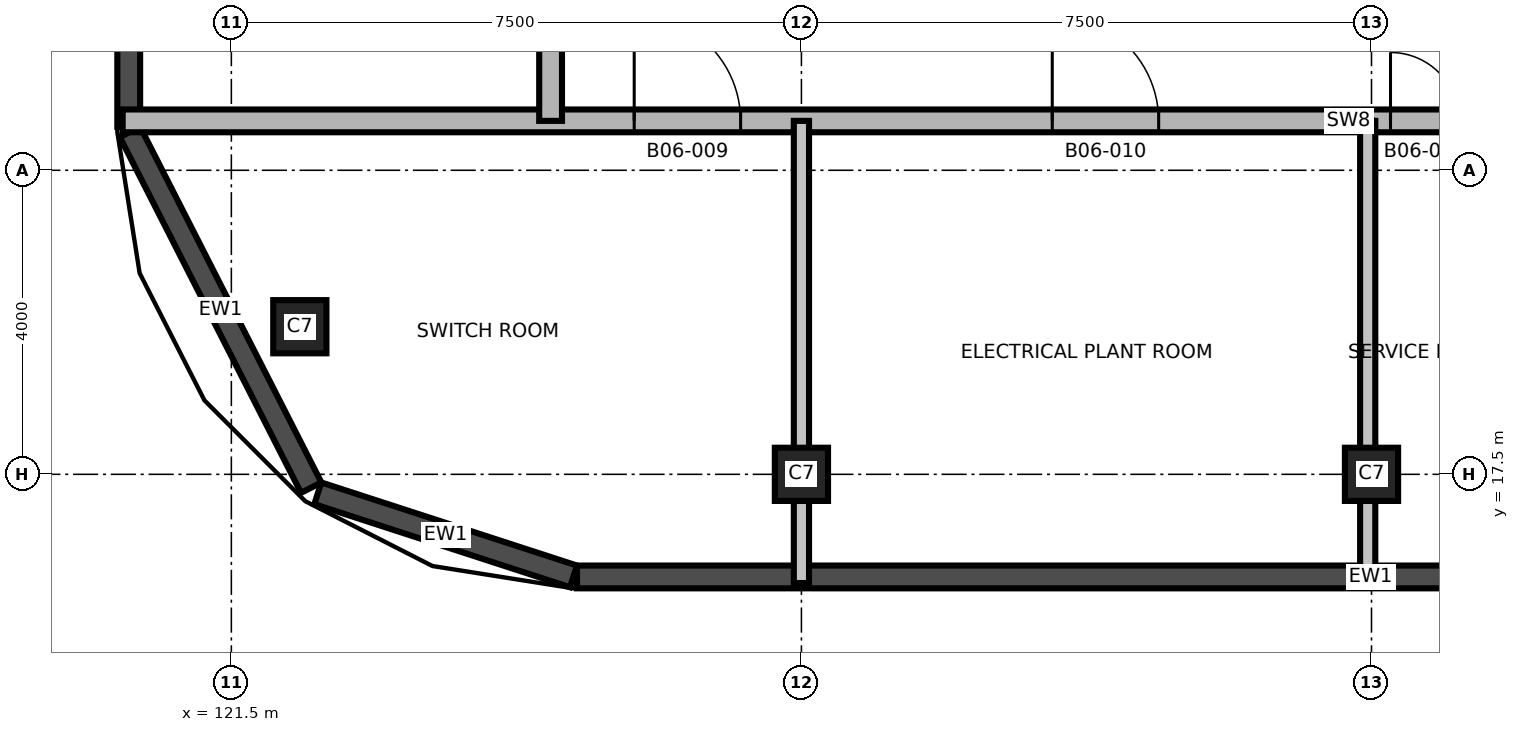
"""IFC4 building model, lengths in metres.
Left out: names, types, materials, properties, quantities, classifications, styles, units other than length and angle.
Written with IfcOpenShell. Run it as: python <this file> out.ifc"""

import sys

from ifc_helpers import new_model, si_unit, direction, frame, frame_2d, origin, origin_2d, place, context, subcontext, project, spatial, rectangle, extrude, element, fill, save


model = new_model("IFC4")
c1 = context("Model", 3, precision=1e-05, world=origin(), true_north=direction((0.0, 1.0)))
c2 = subcontext(c1, "Body", "Model", "MODEL_VIEW")
j1 = project(units=[si_unit("LENGTHUNIT", "METRE"), si_unit("PLANEANGLEUNIT", "RADIAN")], contexts=[c1])
p1 = place(None, origin())
s1 = spatial("IfcSite", under=j1, at=p1, CompositionType="ELEMENT")
p2 = place(p1, origin())
s2 = spatial("IfcBuilding", under=s1, at=p2, CompositionType="ELEMENT")
p3 = place(p2, frame((0.0, 0.0, 81.6)))
s3 = spatial("IfcBuildingStorey", under=s2, at=p3, CompositionType="ELEMENT", Elevation=81.6)
for number, where, z_axis, x_axis in (
    (1, (129.0, 17.5, 0.0), (0.0, 0.0, 1.0), (1.0, 0.0, 0.0)),
    (2, (136.5, 17.5, 0.0), (0.0, 0.0, 1.0), (1.0, 0.0, 0.0)),
    (3, (122.401, 19.442, 0.0), (0.0, 0.0, 1.0), (1.0, 0.0, 0.0)),
):
    element("IfcColumn", number, at=place(p3, frame(where, z_axis=z_axis, x_axis=x_axis)), inside=s3, PredefinedType="COLUMN", context=c2, shape_type="SweptSolid", body=[
        extrude(rectangle(XDim=0.7, YDim=0.7, at=origin_2d()), origin(), (0.0, 0.0, 1.0), 5.5),
    ])
p4 = place(p3, frame((120.166, 22.004, 0.0), z_axis=(0.0, 0.0, 1.0), x_axis=(0.454006562826, -0.890998339455, 0.0)))
e4 = element("IfcWall", 4, at=p4, inside=s3, PredefinedType="SOLIDWALL", context=c2, shape_type="SweptSolid", body=[
    extrude(rectangle(XDim=5.252, YDim=0.3, at=frame_2d((2.626, 0.0))), origin(), (0.0, 0.0, 1.0), 5.2),
])
p5 = place(p3, frame((122.638, 17.25, 0.0), z_axis=(0.0, 0.0, 1.0), x_axis=(0.951038127287, -0.309073584194, 0.0)))
e5 = element("IfcWall", 5, at=p5, inside=s3, PredefinedType="SOLIDWALL", context=c2, shape_type="SweptSolid", body=[
    extrude(rectangle(XDim=3.536, YDim=0.3, at=frame_2d((1.768, 0.0))), origin(), (0.0, 0.0, 1.0), 5.2),
])
p6 = place(p3, frame((126.048, 16.15, 0.0), z_axis=(0.0, 0.0, 1.0), x_axis=(1.0, 0.0, 0.0)))
e6 = element("IfcWall", 6, at=p6, inside=s3, PredefinedType="SOLIDWALL", context=c2, shape_type="SweptSolid", body=[
    extrude(rectangle(XDim=20.88, YDim=0.3, at=frame_2d((10.44, 0.0))), origin(), (0.0, 0.0, 1.0), 5.2),
])
p7 = place(p3, frame((120.15, 39.952, 0.0), z_axis=(0.0, 0.0, 1.0), x_axis=(0.0, -1.0, 0.0)))
e7 = element("IfcWall", 7, at=p7, inside=s3, PredefinedType="SOLIDWALL", context=c2, shape_type="SweptSolid", body=[
    extrude(rectangle(XDim=17.88, YDim=0.3, at=frame_2d((8.94, 0.0))), origin(), (0.0, 0.0, 1.0), 5.2),
])
p8 = place(p3, frame((120.07, 22.15, 0.0), z_axis=(0.0, 0.0, 1.0), x_axis=(1.0, 0.0, 0.0)))
e8 = element("IfcWall", 8, at=p8, inside=s3, PredefinedType="SHEAR", context=c2, shape_type="SweptSolid", body=[
    extrude(rectangle(XDim=32.86, YDim=0.3, at=frame_2d((16.43, 0.0))), origin(), (0.0, 0.0, 1.0), 5.2),
])
p9 = place(p8, frame((22.68, 0.0, 0.0)))
e9 = element("IfcOpeningElement", 9, at=p9, cuts=e8, PredefinedType="OPENING", context=c2, shape_type="SweptSolid", body=[
    extrude(rectangle(XDim=1.0, YDim=2.1, at=frame_2d((0.5, 1.05))), frame((0.0, 0.16, 0.0), z_axis=(0.0, -1.0, 0.0), x_axis=(1.0, 0.0, 0.0)), (0.0, 0.0, 1.0), 0.32),
])
p10 = place(p8, frame((6.73, 0.0, 0.0)))
e10 = element("IfcOpeningElement", 10, at=p10, cuts=e8, PredefinedType="OPENING", context=c2, shape_type="SweptSolid", body=[
    extrude(rectangle(XDim=1.4, YDim=2.1, at=frame_2d((0.7, 1.05))), frame((0.0, 0.16, 0.0), z_axis=(0.0, -1.0, 0.0), x_axis=(1.0, 0.0, 0.0)), (0.0, 0.0, 1.0), 0.32),
])
p11 = place(p8, frame((12.23, 0.0, 0.0)))
e11 = element("IfcOpeningElement", 11, at=p11, cuts=e8, PredefinedType="OPENING", context=c2, shape_type="SweptSolid", body=[
    extrude(rectangle(XDim=1.4, YDim=2.1, at=frame_2d((0.7, 1.05))), frame((0.0, 0.16, 0.0), z_axis=(0.0, -1.0, 0.0), x_axis=(1.0, 0.0, 0.0)), (0.0, 0.0, 1.0), 0.32),
])
p12 = place(p8, frame((25.23, 0.0, 0.0)))
e12 = element("IfcOpeningElement", 12, at=p12, cuts=e8, PredefinedType="OPENING", context=c2, shape_type="SweptSolid", body=[
    extrude(rectangle(XDim=1.4, YDim=2.1, at=frame_2d((0.7, 1.05))), frame((0.0, 0.16, 0.0), z_axis=(0.0, -1.0, 0.0), x_axis=(1.0, 0.0, 0.0)), (0.0, 0.0, 1.0), 0.32),
])
p13 = place(p8, frame((16.68, 0.0, 0.0)))
e13 = element("IfcOpeningElement", 13, at=p13, cuts=e8, PredefinedType="OPENING", context=c2, shape_type="SweptSolid", body=[
    extrude(rectangle(XDim=0.9, YDim=2.1, at=frame_2d((0.45, 1.05))), frame((0.0, 0.16, 0.0), z_axis=(0.0, -1.0, 0.0), x_axis=(1.0, 0.0, 0.0)), (0.0, 0.0, 1.0), 0.32),
])
p14 = place(p3, frame((125.7, 22.15, 0.0), z_axis=(0.0, 0.0, 1.0), x_axis=(0.0, 1.0, 0.0)))
e14 = element("IfcWall", 14, at=p14, inside=s3, PredefinedType="SHEAR", context=c2, shape_type="SweptSolid", body=[
    extrude(rectangle(XDim=17.7, YDim=0.3, at=frame_2d((8.85, 0.0))), origin(), (0.0, 0.0, 1.0), 5.2),
])
p15 = place(p14, frame((7.45, 0.0, 0.0)))
e15 = element("IfcOpeningElement", 15, at=p15, cuts=e14, PredefinedType="OPENING", context=c2, shape_type="SweptSolid", body=[
    extrude(rectangle(XDim=1.2, YDim=2.1, at=frame_2d((0.6, 1.05))), frame((0.0, 0.16, 0.0), z_axis=(0.0, -1.0, 0.0), x_axis=(1.0, 0.0, 0.0)), (0.0, 0.0, 1.0), 0.32),
])
p16 = place(p14, frame((3.25, 0.0, 0.0)))
e16 = element("IfcOpeningElement", 16, at=p16, cuts=e14, PredefinedType="OPENING", context=c2, shape_type="SweptSolid", body=[
    extrude(rectangle(XDim=1.2, YDim=2.1, at=frame_2d((0.6, 1.05))), frame((0.0, 0.16, 0.0), z_axis=(0.0, -1.0, 0.0), x_axis=(1.0, 0.0, 0.0)), (0.0, 0.0, 1.0), 0.32),
])
for number, where, z_axis, x_axis in (
    (17, (129.0, 16.07, 0.0), (0.0, 0.0, 1.0), (0.0, 1.0, 0.0)),
    (18, (136.45, 16.07, 0.0), (0.0, 0.0, 1.0), (0.0, 1.0, 0.0)),
):
    element("IfcWall", number, at=place(p3, frame(where, z_axis=z_axis, x_axis=x_axis)), inside=s3, PredefinedType="PARTITIONING", context=c2, shape_type="SweptSolid", body=[
        extrude(rectangle(XDim=6.08, YDim=0.2, at=frame_2d((3.04, 0.0))), origin(), (0.0, 0.0, 1.0), 5.2),
    ])
p17 = place(p10, origin())
e19 = element("IfcDoor", 19, at=p17, inside=s3, OperationType="SINGLE_SWING_LEFT", PredefinedType="DOOR", context=c2, shape_type="SweptSolid", body=[
    extrude(rectangle(XDim=1.4, YDim=2.1, at=frame_2d((0.7, 1.05))), frame((0.0, 0.025, 0.0), z_axis=(0.0, -1.0, 0.0), x_axis=(1.0, 0.0, 0.0)), (0.0, 0.0, 1.0), 0.05),
])
fill(e10, e19)
p18 = place(p11, origin())
e20 = element("IfcDoor", 20, at=p18, inside=s3, OperationType="SINGLE_SWING_RIGHT", PredefinedType="DOOR", context=c2, shape_type="SweptSolid", body=[
    extrude(rectangle(XDim=1.4, YDim=2.1, at=frame_2d((0.7, 1.05))), frame((0.0, 0.025, 0.0), z_axis=(0.0, -1.0, 0.0), x_axis=(1.0, 0.0, 0.0)), (0.0, 0.0, 1.0), 0.05),
])
fill(e11, e20)
p19 = place(p13, origin())
e21 = element("IfcDoor", 21, at=p19, inside=s3, OperationType="SINGLE_SWING_RIGHT", PredefinedType="DOOR", context=c2, shape_type="SweptSolid", body=[
    extrude(rectangle(XDim=0.9, YDim=2.1, at=frame_2d((0.45, 1.05))), frame((0.0, 0.025, 0.0), z_axis=(0.0, -1.0, 0.0), x_axis=(1.0, 0.0, 0.0)), (0.0, 0.0, 1.0), 0.05),
])
fill(e13, e21)
save(model, sys.argv[1])
